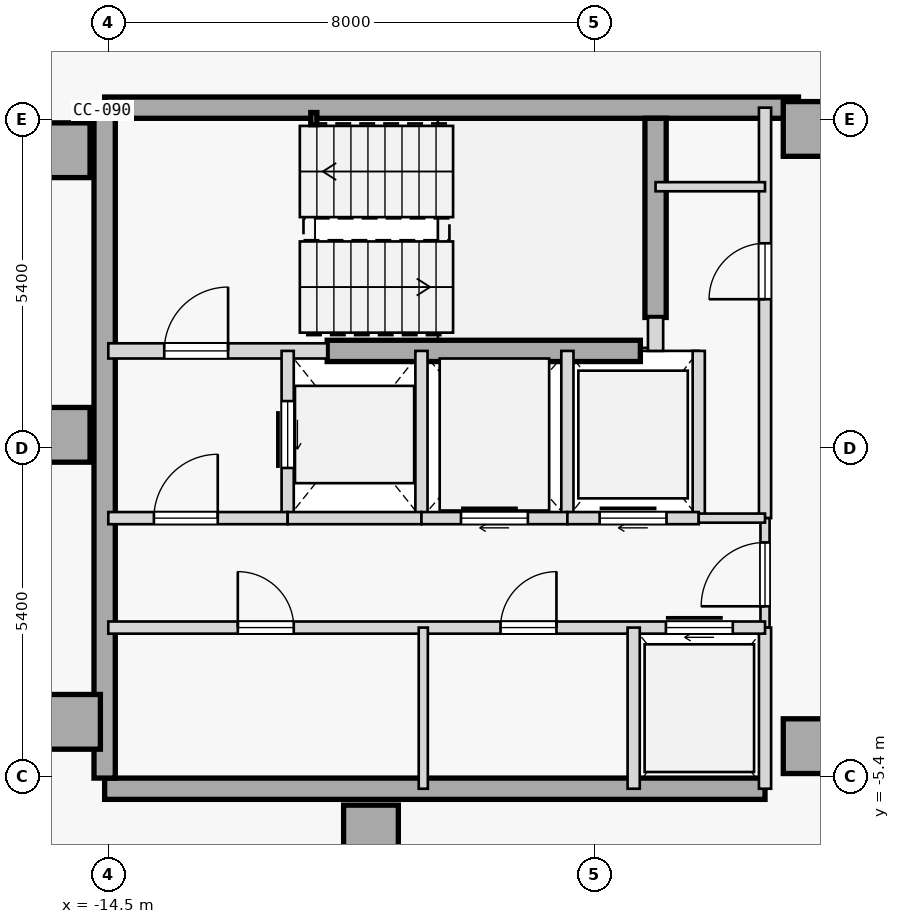
"""IFC4 building model, lengths in metres.
Left out: names, types, materials, properties, quantities, classifications, styles, units other than length and angle.
Written with IfcOpenShell. Run it as: python <this file> out.ifc"""

import sys

from ifc_helpers import new_model, si_unit, direction, frame, frame_2d, origin, origin_2d, place, context, subcontext, project, spatial, rectangle, hollow_rectangle, extrude, element, fill, save


model = new_model("IFC4")
c1 = context("Model", 3, precision=1e-05, world=origin(), true_north=direction((0.0, 1.0)))
c2 = subcontext(c1, "Body", "Model", "MODEL_VIEW")
j1 = project(units=[si_unit("LENGTHUNIT", "METRE"), si_unit("PLANEANGLEUNIT", "RADIAN")], contexts=[c1])
p1 = place(None, origin())
s1 = spatial("IfcSite", under=j1, at=p1, CompositionType="ELEMENT")
p2 = place(p1, origin())
s2 = spatial("IfcBuilding", under=s1, at=p2, CompositionType="ELEMENT")
p3 = place(p2, frame((0.0, 0.0, 272.25)))
s3 = spatial("IfcBuildingStorey", under=s2, at=p3, CompositionType="ELEMENT", Elevation=272.25)
for number, where, z_axis, x_axis in (
    (1, (-15.25, 4.9, 0.0), (0.0, 0.0, 1.0), (1.0, 0.0, 0.0)),
    (2, (-15.25, 0.22, 0.0), (0.0, 0.0, 1.0), (1.0, 0.0, 0.0)),
    (3, (-15.08, -4.5, 0.0), (0.0, 0.0, 1.0), (1.0, 0.0, 0.0)),
    (4, (-10.18, -6.32, 0.0), (0.0, 0.0, 1.0), (1.0, 0.0, 0.0)),
    (5, (-2.95, -4.9, 0.0), (0.0, 0.0, 1.0), (1.0, 0.0, 0.0)),
    (6, (-2.95, 5.25, 0.0), (0.0, 0.0, 1.0), (1.0, 0.0, 0.0)),
):
    element("IfcColumn", number, at=place(p3, frame(where, z_axis=z_axis, x_axis=x_axis)), inside=s3, PredefinedType="COLUMN", context=c2, shape_type="SweptSolid", body=[
        extrude(rectangle(XDim=0.9, YDim=0.9, at=origin_2d()), origin(), (0.0, 0.0, 1.0), 3.35),
    ])
p4 = place(p3, frame((-14.56, 5.6, 0.0), z_axis=(0.0, 0.0, 1.0), x_axis=(1.0, 0.0, 0.0)))
e7 = element("IfcWall", 7, at=p4, inside=s3, PredefinedType="SHEAR", context=c2, shape_type="SweptSolid", body=[
    extrude(rectangle(XDim=11.41, YDim=0.35, at=frame_2d((5.705, 0.0))), origin(), (0.0, 0.0, 1.0), 3.1),
])
p5 = place(p3, frame((-14.56, -5.6, 0.0), z_axis=(0.0, 0.0, 1.0), x_axis=(1.0, 0.0, 0.0)))
e8 = element("IfcWall", 8, at=p5, inside=s3, PredefinedType="SHEAR", context=c2, shape_type="SweptSolid", body=[
    extrude(rectangle(XDim=10.86, YDim=0.35, at=frame_2d((5.43, 0.0))), origin(), (0.0, 0.0, 1.0), 3.1),
])
p6 = place(p3, frame((-14.56, -5.425, 0.0), z_axis=(0.0, 0.0, 1.0), x_axis=(0.0, 1.0, 0.0)))
e9 = element("IfcWall", 9, at=p6, inside=s3, PredefinedType="SHEAR", context=c2, shape_type="SweptSolid", body=[
    extrude(rectangle(XDim=10.85, YDim=0.35, at=frame_2d((5.425, 0.0))), origin(), (0.0, 0.0, 1.0), 3.1),
])
p7 = place(p3, frame((-5.5, 2.15, 0.0), z_axis=(0.0, 0.0, 1.0), x_axis=(0.0, 1.0, 0.0)))
e10 = element("IfcWall", 10, at=p7, inside=s3, PredefinedType="SHEAR", context=c2, shape_type="SweptSolid", body=[
    extrude(rectangle(XDim=3.275, YDim=0.35, at=frame_2d((1.638, 0.0))), origin(), (0.0, 0.0, 1.0), 3.1),
])
p8 = place(p3, frame((-10.9, 1.6, 0.0), z_axis=(0.0, 0.0, 1.0), x_axis=(1.0, 0.0, 0.0)))
e11 = element("IfcWall", 11, at=p8, inside=s3, PredefinedType="SHEAR", context=c2, shape_type="SweptSolid", body=[
    extrude(rectangle(XDim=5.15, YDim=0.35, at=frame_2d((2.575, 0.0))), origin(), (0.0, 0.0, 1.0), 3.1),
])
p9 = place(p3, frame((-11.12, 5.42, 0.0), z_axis=(0.0, 0.0, 1.0), x_axis=(1.0, 0.0, 0.0)))
e12 = element("IfcColumn", 12, at=p9, inside=s3, PredefinedType="COLUMN", context=c2, shape_type="SweptSolid", body=[
    extrude(hollow_rectangle(XDim=0.1, YDim=0.2, WallThickness=0.008, at=origin_2d()), origin(), (0.0, 0.0, 1.0), 3.35),
])
p10 = place(p3, frame((-14.5, 1.6, 0.0), z_axis=(0.0, 0.0, 1.0), x_axis=(1.0, 0.0, 0.0)))
e13 = element("IfcWall", 13, at=p10, inside=s3, PredefinedType="STANDARD", context=c2, shape_type="SweptSolid", body=[
    extrude(rectangle(XDim=3.6, YDim=0.25, at=frame_2d((1.8, 0.0))), origin(), (0.0, 0.0, 1.0), 3.1),
])
p11 = place(p10, frame((0.92, 0.0, 0.0)))
e14 = element("IfcOpeningElement", 14, at=p11, cuts=e13, PredefinedType="OPENING", context=c2, shape_type="SweptSolid", body=[
    extrude(rectangle(XDim=1.05, YDim=2.15, at=frame_2d((0.525, 1.075))), frame((0.0, 0.135, 0.0), z_axis=(0.0, -1.0, 0.0), x_axis=(1.0, 0.0, 0.0)), (0.0, 0.0, 1.0), 0.27),
])
p12 = place(p3, frame((-5.5, 1.6, 0.0), z_axis=(0.0, 0.0, 1.0), x_axis=(0.0, 1.0, 0.0)))
e15 = element("IfcWall", 15, at=p12, inside=s3, PredefinedType="STANDARD", context=c2, shape_type="SweptSolid", body=[
    extrude(rectangle(XDim=0.55, YDim=0.25, at=frame_2d((0.275, 0.0))), origin(), (0.0, 0.0, 1.0), 3.1),
])
p13 = place(p3, frame((-3.7, -1.15, 0.0), z_axis=(0.0, 0.0, 1.0), x_axis=(0.0, 1.0, 0.0)))
e16 = element("IfcWall", 16, at=p13, inside=s3, PredefinedType="STANDARD", context=c2, shape_type="SweptSolid", body=[
    extrude(rectangle(XDim=6.75, YDim=0.2, at=frame_2d((3.375, 0.0))), origin(), (0.0, 0.0, 1.0), 3.1),
])
p14 = place(p13, frame((3.6, 0.0, 0.0)))
e17 = element("IfcOpeningElement", 17, at=p14, cuts=e16, PredefinedType="OPENING", context=c2, shape_type="SweptSolid", body=[
    extrude(rectangle(XDim=0.92, YDim=2.15, at=frame_2d((0.46, 1.075))), frame((0.0, 0.11, 0.0), z_axis=(0.0, -1.0, 0.0), x_axis=(1.0, 0.0, 0.0)), (0.0, 0.0, 1.0), 0.22),
])
p15 = place(p3, frame((-3.7, -2.95, 0.0), z_axis=(0.0, 0.0, 1.0), x_axis=(0.0, 1.0, 0.0)))
e18 = element("IfcWall", 18, at=p15, inside=s3, PredefinedType="PARTITIONING", context=c2, shape_type="SweptSolid", body=[
    extrude(rectangle(XDim=1.8, YDim=0.15, at=frame_2d((0.9, 0.0))), origin(), (0.0, 0.0, 1.0), 3.1),
])
p16 = place(p15, frame((0.35, 0.0, 0.0)))
e19 = element("IfcOpeningElement", 19, at=p16, cuts=e18, PredefinedType="OPENING", context=c2, shape_type="SweptSolid", body=[
    extrude(rectangle(XDim=1.05, YDim=2.18, at=frame_2d((0.525, 1.09))), frame((0.0, 0.085, 0.0), z_axis=(0.0, -1.0, 0.0), x_axis=(1.0, 0.0, 0.0)), (0.0, 0.0, 1.0), 0.17),
])
p17 = place(p3, frame((-3.7, -5.6, 0.0), z_axis=(0.0, 0.0, 1.0), x_axis=(0.0, 1.0, 0.0)))
e20 = element("IfcWall", 20, at=p17, inside=s3, PredefinedType="STANDARD", context=c2, shape_type="SweptSolid", body=[
    extrude(rectangle(XDim=2.65, YDim=0.2, at=frame_2d((1.325, 0.0))), origin(), (0.0, 0.0, 1.0), 3.1),
])
p18 = place(p3, frame((-11.55, -1.15, 0.0), z_axis=(0.0, 0.0, 1.0), x_axis=(0.0, 1.0, 0.0)))
e21 = element("IfcWall", 21, at=p18, inside=s3, PredefinedType="STANDARD", context=c2, shape_type="SweptSolid", body=[
    extrude(rectangle(XDim=2.75, YDim=0.2, at=frame_2d((1.375, 0.0))), origin(), (0.0, 0.0, 1.0), 3.1),
])
p19 = place(p18, frame((0.825, 0.0, 0.0)))
e22 = element("IfcOpeningElement", 22, at=p19, cuts=e21, PredefinedType="OPENING", context=c2, shape_type="SweptSolid", body=[
    extrude(rectangle(XDim=1.1, YDim=2.15, at=frame_2d((0.55, 1.075))), frame((0.0, 0.11, 0.0), z_axis=(0.0, -1.0, 0.0), x_axis=(1.0, 0.0, 0.0)), (0.0, 0.0, 1.0), 0.22),
])
p20 = place(p3, frame((-9.35, -1.15, 0.0), z_axis=(0.0, 0.0, 1.0), x_axis=(0.0, 1.0, 0.0)))
e23 = element("IfcWall", 23, at=p20, inside=s3, PredefinedType="STANDARD", context=c2, shape_type="SweptSolid", body=[
    extrude(rectangle(XDim=2.75, YDim=0.2, at=frame_2d((1.375, 0.0))), origin(), (0.0, 0.0, 1.0), 3.1),
])
p21 = place(p3, frame((-14.5, -1.15, 0.0), z_axis=(0.0, 0.0, 1.0), x_axis=(1.0, 0.0, 0.0)))
e24 = element("IfcWall", 24, at=p21, inside=s3, PredefinedType="STANDARD", context=c2, shape_type="SweptSolid", body=[
    extrude(rectangle(XDim=2.95, YDim=0.2, at=frame_2d((1.475, 0.0))), origin(), (0.0, 0.0, 1.0), 3.1),
])
p22 = place(p21, frame((0.75, 0.0, 0.0)))
e25 = element("IfcOpeningElement", 25, at=p22, cuts=e24, PredefinedType="OPENING", context=c2, shape_type="SweptSolid", body=[
    extrude(rectangle(XDim=1.05, YDim=2.18, at=frame_2d((0.525, 1.09))), frame((0.0, 0.11, 0.0), z_axis=(0.0, -1.0, 0.0), x_axis=(1.0, 0.0, 0.0)), (0.0, 0.0, 1.0), 0.22),
])
p23 = place(p3, frame((-11.55, -1.15, 0.0), z_axis=(0.0, 0.0, 1.0), x_axis=(1.0, 0.0, 0.0)))
e26 = element("IfcWall", 26, at=p23, inside=s3, PredefinedType="STANDARD", context=c2, shape_type="SweptSolid", body=[
    extrude(rectangle(XDim=2.2, YDim=0.2, at=frame_2d((1.1, 0.0))), origin(), (0.0, 0.0, 1.0), 3.1),
])
p24 = place(p3, frame((-6.95, -1.15, 0.0), z_axis=(0.0, 0.0, 1.0), x_axis=(0.0, 1.0, 0.0)))
e27 = element("IfcWall", 27, at=p24, inside=s3, PredefinedType="STANDARD", context=c2, shape_type="SweptSolid", body=[
    extrude(rectangle(XDim=2.75, YDim=0.2, at=frame_2d((1.375, 0.0))), origin(), (0.0, 0.0, 1.0), 3.1),
])
p25 = place(p3, frame((-9.35, -1.15, 0.0), z_axis=(0.0, 0.0, 1.0), x_axis=(1.0, 0.0, 0.0)))
e28 = element("IfcWall", 28, at=p25, inside=s3, PredefinedType="STANDARD", context=c2, shape_type="SweptSolid", body=[
    extrude(rectangle(XDim=2.4, YDim=0.2, at=frame_2d((1.2, 0.0))), origin(), (0.0, 0.0, 1.0), 3.1),
])
p26 = place(p25, frame((0.65, 0.0, 0.0)))
e29 = element("IfcOpeningElement", 29, at=p26, cuts=e28, PredefinedType="OPENING", context=c2, shape_type="SweptSolid", body=[
    extrude(rectangle(XDim=1.1, YDim=2.15, at=frame_2d((0.55, 1.075))), frame((0.0, 0.11, 0.0), z_axis=(0.0, -1.0, 0.0), x_axis=(1.0, 0.0, 0.0)), (0.0, 0.0, 1.0), 0.22),
])
p27 = place(p3, frame((-4.79, -1.15, 0.0), z_axis=(0.0, 0.0, 1.0), x_axis=(0.0, 1.0, 0.0)))
e30 = element("IfcWall", 30, at=p27, inside=s3, PredefinedType="STANDARD", context=c2, shape_type="SweptSolid", body=[
    extrude(rectangle(XDim=2.75, YDim=0.2, at=frame_2d((1.375, 0.0))), origin(), (0.0, 0.0, 1.0), 3.1),
])
p28 = place(p3, frame((-6.95, -1.15, 0.0), z_axis=(0.0, 0.0, 1.0), x_axis=(1.0, 0.0, 0.0)))
e31 = element("IfcWall", 31, at=p28, inside=s3, PredefinedType="STANDARD", context=c2, shape_type="SweptSolid", body=[
    extrude(rectangle(XDim=2.16, YDim=0.2, at=frame_2d((1.08, 0.0))), origin(), (0.0, 0.0, 1.0), 3.1),
])
p29 = place(p28, frame((0.53, 0.0, 0.0)))
e32 = element("IfcOpeningElement", 32, at=p29, cuts=e31, PredefinedType="OPENING", context=c2, shape_type="SweptSolid", body=[
    extrude(rectangle(XDim=1.1, YDim=2.15, at=frame_2d((0.55, 1.075))), frame((0.0, 0.11, 0.0), z_axis=(0.0, -1.0, 0.0), x_axis=(1.0, 0.0, 0.0)), (0.0, 0.0, 1.0), 0.22),
])
p30 = place(p3, frame((-4.79, -1.15, 0.0), z_axis=(0.0, 0.0, 1.0), x_axis=(1.0, 0.0, 0.0)))
e33 = element("IfcWall", 33, at=p30, inside=s3, PredefinedType="PARTITIONING", context=c2, shape_type="SweptSolid", body=[
    extrude(rectangle(XDim=1.09, YDim=0.15, at=frame_2d((0.545, 0.0))), origin(), (0.0, 0.0, 1.0), 3.1),
])
p31 = place(p3, frame((-14.5, -2.95, 0.0), z_axis=(0.0, 0.0, 1.0), x_axis=(1.0, 0.0, 0.0)))
e34 = element("IfcWall", 34, at=p31, inside=s3, PredefinedType="STANDARD", context=c2, shape_type="SweptSolid", body=[
    extrude(rectangle(XDim=10.8, YDim=0.2, at=frame_2d((5.4, 0.0))), origin(), (0.0, 0.0, 1.0), 3.1),
])
p32 = place(p31, frame((9.17, 0.0, 0.0)))
e35 = element("IfcOpeningElement", 35, at=p32, cuts=e34, PredefinedType="OPENING", context=c2, shape_type="SweptSolid", body=[
    extrude(rectangle(XDim=1.1, YDim=2.15, at=frame_2d((0.55, 1.075))), frame((0.0, 0.11, 0.0), z_axis=(0.0, -1.0, 0.0), x_axis=(1.0, 0.0, 0.0)), (0.0, 0.0, 1.0), 0.22),
])
p33 = place(p31, frame((2.13, 0.0, 0.0)))
e36 = element("IfcOpeningElement", 36, at=p33, cuts=e34, PredefinedType="OPENING", context=c2, shape_type="SweptSolid", body=[
    extrude(rectangle(XDim=0.92, YDim=2.15, at=frame_2d((0.46, 1.075))), frame((0.0, 0.11, 0.0), z_axis=(0.0, -1.0, 0.0), x_axis=(1.0, 0.0, 0.0)), (0.0, 0.0, 1.0), 0.22),
])
p34 = place(p31, frame((6.45, 0.0, 0.0)))
e37 = element("IfcOpeningElement", 37, at=p34, cuts=e34, PredefinedType="OPENING", context=c2, shape_type="SweptSolid", body=[
    extrude(rectangle(XDim=0.92, YDim=2.15, at=frame_2d((0.46, 1.075))), frame((0.0, 0.11, 0.0), z_axis=(0.0, -1.0, 0.0), x_axis=(1.0, 0.0, 0.0)), (0.0, 0.0, 1.0), 0.22),
])
p35 = place(p3, frame((-5.86, -5.6, 0.0), z_axis=(0.0, 0.0, 1.0), x_axis=(0.0, 1.0, 0.0)))
e38 = element("IfcWall", 38, at=p35, inside=s3, PredefinedType="STANDARD", context=c2, shape_type="SweptSolid", body=[
    extrude(rectangle(XDim=2.65, YDim=0.2, at=frame_2d((1.325, 0.0))), origin(), (0.0, 0.0, 1.0), 3.1),
])
p36 = place(p3, frame((-9.32, -5.6, 0.0), z_axis=(0.0, 0.0, 1.0), x_axis=(0.0, 1.0, 0.0)))
e39 = element("IfcWall", 39, at=p36, inside=s3, PredefinedType="PARTITIONING", context=c2, shape_type="SweptSolid", body=[
    extrude(rectangle(XDim=2.65, YDim=0.15, at=frame_2d((1.325, 0.0))), origin(), (0.0, 0.0, 1.0), 3.1),
])
p37 = place(p3, frame((-5.5, 4.3, 0.0), z_axis=(0.0, 0.0, 1.0), x_axis=(1.0, 0.0, 0.0)))
e40 = element("IfcWall", 40, at=p37, inside=s3, PredefinedType="PARTITIONING", context=c2, shape_type="SweptSolid", body=[
    extrude(rectangle(XDim=1.8, YDim=0.15, at=frame_2d((0.9, 0.0))), origin(), (0.0, 0.0, 1.0), 3.1),
])
p38 = place(p3, frame((-16.716, 6.387, 0.0), z_axis=(0.0, 0.0, 1.0), x_axis=(0.913548379071, 0.406730081378, 0.0)))
e41 = element("IfcWall", 41, at=p38, inside=s3, PredefinedType="PARTITIONING", context=c2, shape_type="SweptSolid", body=[
    extrude(rectangle(XDim=5.015, YDim=0.15, at=frame_2d((2.508, 0.0))), origin(), (0.0, 0.0, 1.0), 3.1),
])
p39 = place(p38, frame((2.032, 0.0, 0.0)))
e42 = element("IfcOpeningElement", 42, at=p39, cuts=e41, PredefinedType="OPENING", context=c2, shape_type="SweptSolid", body=[
    extrude(rectangle(XDim=0.95, YDim=2.15, at=frame_2d((0.475, 1.075))), frame((0.0, 0.085, 0.0), z_axis=(0.0, -1.0, 0.0), x_axis=(1.0, 0.0, 0.0)), (0.0, 0.0, 1.0), 0.17),
])
p40 = place(p3, frame((-14.87, -9.159, 0.0), z_axis=(0.0, 0.0, 1.0), x_axis=(-0.40674435803, 0.913542022685, 0.0)))
e43 = element("IfcWall", 43, at=p40, inside=s3, PredefinedType="PARTITIONING", context=c2, shape_type="SweptSolid", body=[
    extrude(rectangle(XDim=5.383, YDim=0.15, at=frame_2d((2.691, 0.0))), origin(), (0.0, 0.0, 1.0), 3.1),
])
p41 = place(p11, origin())
e44 = element("IfcDoor", 44, at=p41, inside=s3, OperationType="SINGLE_SWING_RIGHT", PredefinedType="DOOR", context=c2, shape_type="SweptSolid", body=[
    extrude(rectangle(XDim=1.05, YDim=2.15, at=frame_2d((0.525, 1.075))), frame((0.0, 0.025, 0.0), z_axis=(0.0, -1.0, 0.0), x_axis=(1.0, 0.0, 0.0)), (0.0, 0.0, 1.0), 0.05),
])
fill(e14, e44)
p42 = place(p22, origin())
e45 = element("IfcDoor", 45, at=p42, inside=s3, OperationType="SINGLE_SWING_RIGHT", PredefinedType="DOOR", context=c2, shape_type="SweptSolid", body=[
    extrude(rectangle(XDim=1.05, YDim=2.18, at=frame_2d((0.525, 1.09))), frame((0.0, 0.025, 0.0), z_axis=(0.0, -1.0, 0.0), x_axis=(1.0, 0.0, 0.0)), (0.0, 0.0, 1.0), 0.05),
])
fill(e25, e45)
p43 = place(p16, origin())
e46 = element("IfcDoor", 46, at=p43, inside=s3, OperationType="SINGLE_SWING_LEFT", PredefinedType="DOOR", context=c2, shape_type="SweptSolid", body=[
    extrude(rectangle(XDim=1.05, YDim=2.18, at=frame_2d((0.525, 1.09))), frame((0.0, 0.025, 0.0), z_axis=(0.0, -1.0, 0.0), x_axis=(1.0, 0.0, 0.0)), (0.0, 0.0, 1.0), 0.05),
])
fill(e19, e46)
p44 = place(p19, origin())
e47 = element("IfcDoor", 47, at=p44, inside=s3, OperationType="SLIDING_TO_RIGHT", PredefinedType="DOOR", context=c2, shape_type="SweptSolid", body=[
    extrude(rectangle(XDim=1.1, YDim=2.15, at=frame_2d((0.55, 1.075))), frame((0.0, 0.025, 0.0), z_axis=(0.0, -1.0, 0.0), x_axis=(1.0, 0.0, 0.0)), (0.0, 0.0, 1.0), 0.05),
])
fill(e22, e47)
p45 = place(p26, origin())
e48 = element("IfcDoor", 48, at=p45, inside=s3, OperationType="SLIDING_TO_RIGHT", PredefinedType="DOOR", context=c2, shape_type="SweptSolid", body=[
    extrude(rectangle(XDim=1.1, YDim=2.15, at=frame_2d((0.55, 1.075))), frame((0.0, 0.025, 0.0), z_axis=(0.0, -1.0, 0.0), x_axis=(1.0, 0.0, 0.0)), (0.0, 0.0, 1.0), 0.05),
])
fill(e29, e48)
p46 = place(p29, origin())
e49 = element("IfcDoor", 49, at=p46, inside=s3, OperationType="SLIDING_TO_RIGHT", PredefinedType="DOOR", context=c2, shape_type="SweptSolid", body=[
    extrude(rectangle(XDim=1.1, YDim=2.15, at=frame_2d((0.55, 1.075))), frame((0.0, 0.025, 0.0), z_axis=(0.0, -1.0, 0.0), x_axis=(1.0, 0.0, 0.0)), (0.0, 0.0, 1.0), 0.05),
])
fill(e32, e49)
p47 = place(p32, origin())
e50 = element("IfcDoor", 50, at=p47, inside=s3, OperationType="SLIDING_TO_RIGHT", PredefinedType="DOOR", context=c2, shape_type="SweptSolid", body=[
    extrude(rectangle(XDim=1.1, YDim=2.15, at=frame_2d((0.55, 1.075))), frame((0.0, 0.025, 0.0), z_axis=(0.0, -1.0, 0.0), x_axis=(1.0, 0.0, 0.0)), (0.0, 0.0, 1.0), 0.05),
])
fill(e35, e50)
p48 = place(p33, origin())
e51 = element("IfcDoor", 51, at=p48, inside=s3, OperationType="SINGLE_SWING_LEFT", PredefinedType="DOOR", context=c2, shape_type="SweptSolid", body=[
    extrude(rectangle(XDim=0.92, YDim=2.15, at=frame_2d((0.46, 1.075))), frame((0.0, 0.025, 0.0), z_axis=(0.0, -1.0, 0.0), x_axis=(1.0, 0.0, 0.0)), (0.0, 0.0, 1.0), 0.05),
])
fill(e36, e51)
p49 = place(p34, origin())
e52 = element("IfcDoor", 52, at=p49, inside=s3, OperationType="SINGLE_SWING_RIGHT", PredefinedType="DOOR", context=c2, shape_type="SweptSolid", body=[
    extrude(rectangle(XDim=0.92, YDim=2.15, at=frame_2d((0.46, 1.075))), frame((0.0, 0.025, 0.0), z_axis=(0.0, -1.0, 0.0), x_axis=(1.0, 0.0, 0.0)), (0.0, 0.0, 1.0), 0.05),
])
fill(e37, e52)
p50 = place(p14, origin())
e53 = element("IfcDoor", 53, at=p50, inside=s3, OperationType="SINGLE_SWING_LEFT", PredefinedType="DOOR", context=c2, shape_type="SweptSolid", body=[
    extrude(rectangle(XDim=0.92, YDim=2.15, at=frame_2d((0.46, 1.075))), frame((0.0, 0.025, 0.0), z_axis=(0.0, -1.0, 0.0), x_axis=(1.0, 0.0, 0.0)), (0.0, 0.0, 1.0), 0.05),
])
fill(e17, e53)
save(model, sys.argv[1])
